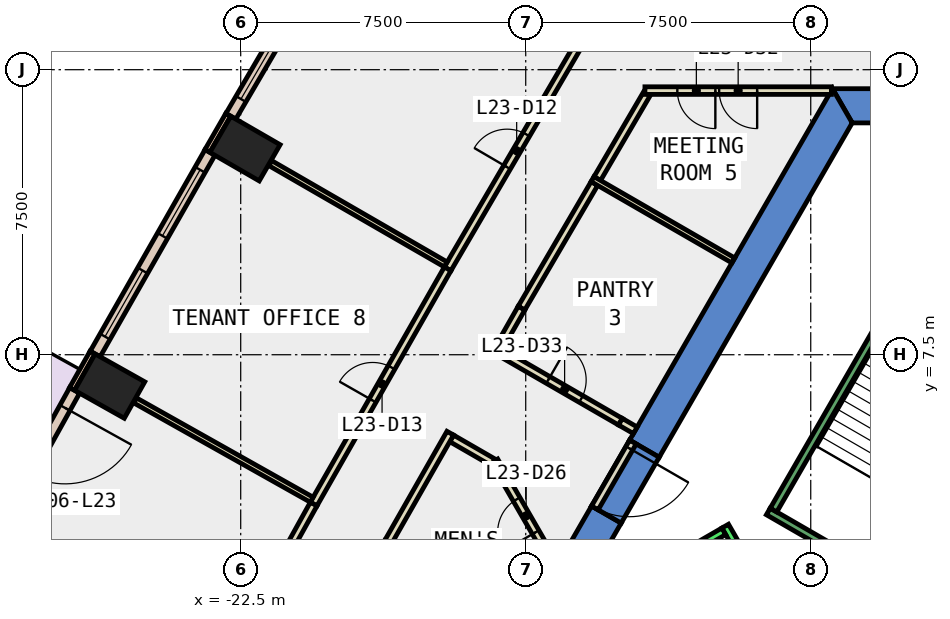
"""IFC4 building model, lengths in metres.
Left out: names, types, materials, properties, quantities, classifications, styles, units other than length and angle.
Written with IfcOpenShell. Run it as: python <this file> out.ifc"""

import sys

from ifc_helpers import new_model, si_unit, direction, frame, frame_2d, origin, origin_2d, place, context, subcontext, project, spatial, polyline, rectangle, outline, extrude, element, fill, save


model = new_model("IFC4")
c1 = context("Model", 3, precision=1e-05, world=origin(), true_north=direction((0.0, 1.0)))
c2 = subcontext(c1, "Body", "Model", "MODEL_VIEW")
j1 = project(units=[si_unit("LENGTHUNIT", "METRE"), si_unit("PLANEANGLEUNIT", "RADIAN")], contexts=[c1])
p1 = place(None, origin())
s1 = spatial("IfcSite", under=j1, at=p1, CompositionType="ELEMENT")
p2 = place(p1, origin())
s2 = spatial("IfcBuilding", under=s1, at=p2, CompositionType="ELEMENT")
p3 = place(p2, frame((0.0, 0.0, 107.6)))
s3 = spatial("IfcBuildingStorey", under=s2, at=p3, CompositionType="ELEMENT", Elevation=107.6)
for number, where, z_axis, x_axis in (
    (1, (-22.387, 12.925, -0.4), (0.0, 0.0, 1.0), (0.5, 0.866, 0.0)),
    (2, (-25.948, 6.675, -0.4), (0.0, 0.0, 1.0), (0.49, 0.872, 0.0)),
):
    element("IfcColumn", number, at=place(p3, frame(where, z_axis=z_axis, x_axis=x_axis)), inside=s3, PredefinedType="COLUMN", context=c2, shape_type="SweptSolid", body=[
        extrude(rectangle(XDim=1.1, YDim=1.5, at=origin_2d()), origin(), (0.0, 0.0, 1.0), 4.2),
    ])
p4 = place(p3, frame((0.0, 0.0, -0.4)))
e3 = element("IfcWall", 3, at=p4, inside=s3, PredefinedType="SHEAR", context=c2, shape_type="SweptSolid", body=[
    extrude(outline(polyline([(-4.55, 13.6), (-4.55, 14.5), (-6.928, 14.5), (-6.409, 13.6), (-4.55, 13.6)])), origin(), (0.0, 0.0, 1.0), 4.2),
])
p5 = place(p3, frame((0.0, 0.0, -0.4)))
e4 = element("IfcWall", 4, at=p5, inside=s3, PredefinedType="SHEAR", context=c2, shape_type="SweptSolid", body=[
    extrude(outline(polyline([(-12.267, 5.252), (-11.488, 4.802), (-6.409, 13.6), (-6.928, 14.5), (-12.267, 5.252)])), origin(), (0.0, 0.0, 1.0), 4.2),
])
p6 = place(p3, frame((0.0, 0.0, -0.4)))
e5 = element("IfcWall", 5, at=p6, inside=s3, PredefinedType="SHEAR", context=c2, shape_type="SweptSolid", body=[
    extrude(outline(polyline([(-12.488, 3.07), (-13.267, 3.52), (-13.856, 2.5), (-12.817, 2.5), (-12.488, 3.07)])), origin(), (0.0, 0.0, 1.0), 4.2),
])
p7 = place(p3, frame((0.0, 0.0, 3.6)))
e6 = element("IfcWall", 6, at=p7, inside=s3, PredefinedType="SHEAR", context=c2, shape_type="SweptSolid", body=[
    extrude(outline(polyline([(-13.267, 3.52), (-12.488, 3.07), (-11.488, 4.802), (-12.267, 5.252), (-13.267, 3.52)])), origin(), (0.0, 0.0, 1.0), 0.2),
])
p8 = place(p3, frame((-22.826, 13.814, 0.0), z_axis=(0.0, 0.0, 1.0), x_axis=(-0.499933745558, -0.866063652425, 0.0)))
e7 = element("IfcWall", 7, at=p8, inside=s3, PredefinedType="STANDARD", context=c2, shape_type="SweptSolid", body=[
    extrude(rectangle(XDim=1.1, YDim=0.15, at=frame_2d((0.55, 0.0))), origin(), (0.0, 0.0, 1.0), 3.8),
])
p9 = place(p3, frame((-26.398, 7.559, 0.0), z_axis=(0.0, 0.0, 1.0), x_axis=(-0.490008344094, -0.871717742574, 0.0)))
e8 = element("IfcWall", 8, at=p9, inside=s3, PredefinedType="STANDARD", context=c2, shape_type="SweptSolid", body=[
    extrude(rectangle(XDim=1.1, YDim=0.15, at=frame_2d((0.55, 0.0))), origin(), (0.0, 0.0, 1.0), 3.8),
])
p10 = place(p3, frame((-19.677, 19.043, 0.0), z_axis=(0.0, 0.0, 1.0), x_axis=(-0.50490018297, -0.863177736759, 0.0)))
e9 = element("IfcWall", 9, at=p10, inside=s3, PredefinedType="STANDARD", context=c2, shape_type="SweptSolid", body=[
    extrude(rectangle(XDim=6.104, YDim=0.3, at=frame_2d((3.052, 0.0))), origin(), (0.0, 0.0, 1.0), 3.8),
])
p11 = place(p10, frame((0.526, 0.0, 0.9)))
e10 = element("IfcOpeningElement", 10, at=p11, cuts=e9, PredefinedType="OPENING", context=c2, shape_type="SweptSolid", body=[
    extrude(rectangle(XDim=2.0, YDim=2.6, at=frame_2d((1.0, 1.3))), frame((0.0, 0.16, 0.0), z_axis=(0.0, -1.0, 0.0), x_axis=(1.0, 0.0, 0.0)), (0.0, 0.0, 1.0), 0.32),
])
p12 = place(p10, frame((3.578, 0.0, 0.9)))
e11 = element("IfcOpeningElement", 11, at=p12, cuts=e9, PredefinedType="OPENING", context=c2, shape_type="SweptSolid", body=[
    extrude(rectangle(XDim=2.0, YDim=2.6, at=frame_2d((1.0, 1.3))), frame((0.0, 0.16, 0.0), z_axis=(0.0, -1.0, 0.0), x_axis=(1.0, 0.0, 0.0)), (0.0, 0.0, 1.0), 0.32),
])
p13 = place(p3, frame((-23.308, 12.823, 0.0), z_axis=(0.0, 0.0, 1.0), x_axis=(-0.495113375427, -0.868828375154, 0.0)))
e12 = element("IfcWall", 12, at=p13, inside=s3, PredefinedType="STANDARD", context=c2, shape_type="SweptSolid", body=[
    extrude(rectangle(XDim=6.104, YDim=0.3, at=frame_2d((3.052, 0.0))), origin(), (0.0, 0.0, 1.0), 3.8),
])
p14 = place(p13, frame((0.526, 0.0, 0.9)))
e13 = element("IfcOpeningElement", 13, at=p14, cuts=e12, PredefinedType="OPENING", context=c2, shape_type="SweptSolid", body=[
    extrude(rectangle(XDim=2.0, YDim=2.6, at=frame_2d((1.0, 1.3))), frame((0.0, 0.16, 0.0), z_axis=(0.0, -1.0, 0.0), x_axis=(1.0, 0.0, 0.0)), (0.0, 0.0, 1.0), 0.32),
])
p15 = place(p13, frame((3.578, 0.0, 0.9)))
e14 = element("IfcOpeningElement", 14, at=p15, cuts=e12, PredefinedType="OPENING", context=c2, shape_type="SweptSolid", body=[
    extrude(rectangle(XDim=2.0, YDim=2.6, at=frame_2d((1.0, 1.3))), frame((0.0, 0.16, 0.0), z_axis=(0.0, -1.0, 0.0), x_axis=(1.0, 0.0, 0.0)), (0.0, 0.0, 1.0), 0.32),
])
p16 = place(p3, frame((-26.869, 6.562, 0.0), z_axis=(0.0, 0.0, 1.0), x_axis=(-0.485170774404, -0.874419418623, 0.0)))
e15 = element("IfcWall", 15, at=p16, inside=s3, PredefinedType="STANDARD", context=c2, shape_type="SweptSolid", body=[
    extrude(rectangle(XDim=6.103, YDim=0.3, at=frame_2d((3.052, 0.0))), origin(), (0.0, 0.0, 1.0), 3.8),
])
p17 = place(p16, frame((0.526, 0.0, 0.0)))
e16 = element("IfcOpeningElement", 16, at=p17, cuts=e15, PredefinedType="OPENING", context=c2, shape_type="SweptSolid", body=[
    extrude(rectangle(XDim=2.0, YDim=2.4, at=frame_2d((1.0, 1.2))), frame((0.0, 0.16, 0.0), z_axis=(0.0, -1.0, 0.0), x_axis=(1.0, 0.0, 0.0)), (0.0, 0.0, 1.0), 0.32),
])
p18 = place(p16, frame((3.578, 0.0, 0.9)))
e17 = element("IfcOpeningElement", 17, at=p18, cuts=e15, PredefinedType="OPENING", context=c2, shape_type="SweptSolid", body=[
    extrude(rectangle(XDim=2.0, YDim=2.6, at=frame_2d((1.0, 1.3))), frame((0.0, 0.16, 0.0), z_axis=(0.0, -1.0, 0.0), x_axis=(1.0, 0.0, 0.0)), (0.0, 0.0, 1.0), 0.32),
])
p19 = place(p3, frame((-11.814, 14.364, 0.0), z_axis=(0.0, 0.0, 1.0), x_axis=(-0.504658640018, -0.863318977583, 0.0)))
e18 = element("IfcWall", 18, at=p19, inside=s3, PredefinedType="PARTITIONING", context=c2, shape_type="SweptSolid", body=[
    extrude(rectangle(XDim=2.582, YDim=0.2, at=frame_2d((1.291, 0.0))), origin(), (0.0, 0.0, 1.0), 3.8),
])
p20 = place(p3, frame((-13.193, 12.005, 0.0), z_axis=(0.0, 0.0, 1.0), x_axis=(-0.50499711829, -0.863121028894, 0.0)))
e19 = element("IfcWall", 19, at=p20, inside=s3, PredefinedType="PARTITIONING", context=c2, shape_type="SweptSolid", body=[
    extrude(rectangle(XDim=3.8, YDim=0.2, at=frame_2d((1.9, 0.0))), origin(), (0.0, 0.0, 1.0), 3.8),
])
p21 = place(p3, frame((-15.112, 8.725, 0.0), z_axis=(0.0, 0.0, 1.0), x_axis=(-0.495074026382, -0.868850797549, 0.0)))
e20 = element("IfcWall", 20, at=p21, inside=s3, PredefinedType="PARTITIONING", context=c2, shape_type="SweptSolid", body=[
    extrude(rectangle(XDim=1.186, YDim=0.2, at=frame_2d((0.593, 0.0))), origin(), (0.0, 0.0, 1.0), 3.8),
])
p22 = place(p3, frame((-15.835, 7.658, 0.0), z_axis=(0.0, 0.0, 1.0), x_axis=(0.866076614194, -0.499911290476, 0.0)))
e21 = element("IfcWall", 21, at=p22, inside=s3, PredefinedType="PARTITIONING", context=c2, shape_type="SweptSolid", body=[
    extrude(rectangle(XDim=3.843, YDim=0.2, at=frame_2d((1.921, 0.0))), origin(), (0.0, 0.0, 1.0), 3.8),
])
p23 = place(p22, frame((1.646, 0.0, 0.0)))
e22 = element("IfcOpeningElement", 22, at=p23, cuts=e21, PredefinedType="OPENING", context=c2, shape_type="SweptSolid", body=[
    extrude(rectangle(XDim=1.0, YDim=2.1, at=frame_2d((0.5, 1.05))), frame((0.0, 0.11, 0.0), z_axis=(0.0, -1.0, 0.0), x_axis=(1.0, 0.0, 0.0)), (0.0, 0.0, 1.0), 0.22),
])
p24 = place(p3, frame((-14.154, 1.815, 0.0), z_axis=(0.0, 0.0, 1.0), x_axis=(-0.500038857296, 0.866002968352, 0.0)))
e23 = element("IfcWall", 23, at=p24, inside=s3, PredefinedType="PARTITIONING", context=c2, shape_type="SweptSolid", body=[
    extrude(rectangle(XDim=3.34, YDim=0.2, at=frame_2d((1.67, 0.0))), origin(), (0.0, 0.0, 1.0), 3.8),
])
p25 = place(p24, frame((1.17, 0.0, 0.0)))
e24 = element("IfcOpeningElement", 24, at=p25, cuts=e23, PredefinedType="OPENING", context=c2, shape_type="SweptSolid", body=[
    extrude(rectangle(XDim=1.0, YDim=2.1, at=frame_2d((0.5, 1.05))), frame((0.0, 0.11, 0.0), z_axis=(0.0, -1.0, 0.0), x_axis=(1.0, 0.0, 0.0)), (0.0, 0.0, 1.0), 0.22),
])
p26 = place(p3, frame((-15.86, 4.671, 0.0), z_axis=(0.0, 0.0, 1.0), x_axis=(-0.866192052573, 0.49971124468, 0.0)))
e25 = element("IfcWall", 25, at=p26, inside=s3, PredefinedType="PARTITIONING", context=c2, shape_type="SweptSolid", body=[
    extrude(rectangle(XDim=1.257, YDim=0.2, at=frame_2d((0.628, 0.0))), origin(), (0.0, 0.0, 1.0), 3.8),
])
p27 = place(p3, frame((-16.986, 5.436, 0.0), z_axis=(0.0, 0.0, 1.0), x_axis=(-0.49514688151, -0.868809280412, 0.0)))
e26 = element("IfcWall", 26, at=p27, inside=s3, PredefinedType="PARTITIONING", context=c2, shape_type="SweptSolid", body=[
    extrude(rectangle(XDim=3.314, YDim=0.2, at=frame_2d((1.657, 0.0))), origin(), (0.0, 0.0, 1.0), 3.8),
])
p28 = place(p3, frame((-17.055, 9.76, 0.0), z_axis=(0.0, 0.0, 1.0), x_axis=(0.504817517618, 0.863226085047, 0.0)))
e27 = element("IfcWall", 27, at=p28, inside=s3, PredefinedType="PARTITIONING", context=c2, shape_type="SweptSolid", body=[
    extrude(rectangle(XDim=7.199, YDim=0.2, at=frame_2d((3.599, 0.0))), origin(), (0.0, 0.0, 1.0), 3.8),
])
p29 = place(p28, frame((3.099, 0.0, 0.0)))
e28 = element("IfcOpeningElement", 28, at=p29, cuts=e27, PredefinedType="OPENING", context=c2, shape_type="SweptSolid", body=[
    extrude(rectangle(XDim=1.0, YDim=2.1, at=frame_2d((0.5, 1.05))), frame((0.0, 0.11, 0.0), z_axis=(0.0, -1.0, 0.0), x_axis=(1.0, 0.0, 0.0)), (0.0, 0.0, 1.0), 0.22),
])
p30 = place(p3, frame((-20.581, 3.571, 0.0), z_axis=(0.0, 0.0, 1.0), x_axis=(0.495138372197, 0.868814129937, 0.0)))
e29 = element("IfcWall", 29, at=p30, inside=s3, PredefinedType="PARTITIONING", context=c2, shape_type="SweptSolid", body=[
    extrude(rectangle(XDim=7.124, YDim=0.2, at=frame_2d((3.562, 0.0))), origin(), (0.0, 0.0, 1.0), 3.8),
])
p31 = place(p30, frame((3.137, 0.0, 0.0)))
e30 = element("IfcOpeningElement", 30, at=p31, cuts=e29, PredefinedType="OPENING", context=c2, shape_type="SweptSolid", body=[
    extrude(rectangle(XDim=1.0, YDim=2.1, at=frame_2d((0.5, 1.05))), frame((0.0, 0.11, 0.0), z_axis=(0.0, -1.0, 0.0), x_axis=(1.0, 0.0, 0.0)), (0.0, 0.0, 1.0), 0.22),
])
p32 = place(p3, frame((-24.0, -2.593, 0.0), z_axis=(0.0, 0.0, 1.0), x_axis=(0.485148833338, 0.874431592242, 0.0)))
e31 = element("IfcWall", 31, at=p32, inside=s3, PredefinedType="PARTITIONING", context=c2, shape_type="SweptSolid", body=[
    extrude(rectangle(XDim=7.049, YDim=0.2, at=frame_2d((3.525, 0.0))), origin(), (0.0, 0.0, 1.0), 3.8),
])
p33 = place(p32, frame((3.099, 0.0, 0.0)))
e32 = element("IfcOpeningElement", 32, at=p33, cuts=e31, PredefinedType="OPENING", context=c2, shape_type="SweptSolid", body=[
    extrude(rectangle(XDim=1.0, YDim=2.1, at=frame_2d((0.5, 1.05))), frame((0.0, 0.11, 0.0), z_axis=(0.0, -1.0, 0.0), x_axis=(1.0, 0.0, 0.0)), (0.0, 0.0, 1.0), 0.22),
])
p34 = place(p3, frame((-9.537, 9.981, 0.0), z_axis=(0.0, 0.0, 1.0), x_axis=(-0.866007866579, 0.5000303741, 0.0)))
e33 = element("IfcWall", 33, at=p34, inside=s3, PredefinedType="PARTITIONING", context=c2, shape_type="SweptSolid", body=[
    extrude(rectangle(XDim=4.278, YDim=0.15, at=frame_2d((2.139, 0.0))), origin(), (0.0, 0.0, 1.0), 3.8),
])
p35 = place(p3, frame((-6.957, 14.45, 0.0), z_axis=(0.0, 0.0, 1.0), x_axis=(-1.0, 0.0, 0.0)))
e34 = element("IfcWall", 34, at=p35, inside=s3, PredefinedType="PARTITIONING", context=c2, shape_type="SweptSolid", body=[
    extrude(rectangle(XDim=4.906, YDim=0.2, at=frame_2d((2.453, 0.0))), origin(), (0.0, 0.0, 1.0), 3.8),
])
p36 = place(p35, frame((1.953, 0.0, 0.0)))
e35 = element("IfcOpeningElement", 35, at=p36, cuts=e34, PredefinedType="OPENING", context=c2, shape_type="SweptSolid", body=[
    extrude(rectangle(XDim=1.0, YDim=2.1, at=frame_2d((0.5, 1.05))), frame((0.0, 0.11, 0.0), z_axis=(0.0, -1.0, 0.0), x_axis=(1.0, 0.0, 0.0)), (0.0, 0.0, 1.0), 0.22),
])
p37 = place(p35, frame((3.053, 0.0, 0.0)))
e36 = element("IfcOpeningElement", 36, at=p37, cuts=e34, PredefinedType="OPENING", context=c2, shape_type="SweptSolid", body=[
    extrude(rectangle(XDim=1.0, YDim=2.1, at=frame_2d((0.5, 1.05))), frame((0.0, 0.11, 0.0), z_axis=(0.0, -1.0, 0.0), x_axis=(1.0, 0.0, 0.0)), (0.0, 0.0, 1.0), 0.22),
])
p38 = place(p3, frame((-17.104, 9.875, 0.0), z_axis=(0.0, 0.0, 1.0), x_axis=(-0.866024640963, 0.500001321243, 0.0)))
e37 = element("IfcWall", 37, at=p38, inside=s3, PredefinedType="PARTITIONING", context=c2, shape_type="SweptSolid", body=[
    extrude(rectangle(XDim=5.33, YDim=0.15, at=frame_2d((2.665, 0.0))), origin(), (0.0, 0.0, 1.0), 3.8),
])
p39 = place(p3, frame((-20.631, 3.685, 0.0), z_axis=(0.0, 0.0, 1.0), x_axis=(-0.871680720442, 0.490074200106, 0.0)))
e38 = element("IfcWall", 38, at=p39, inside=s3, PredefinedType="PARTITIONING", context=c2, shape_type="SweptSolid", body=[
    extrude(rectangle(XDim=5.33, YDim=0.15, at=frame_2d((2.665, 0.0))), origin(), (0.0, 0.0, 1.0), 3.8),
])
p40 = place(p3, frame((-12.18, 5.202, 0.0), z_axis=(0.0, 0.0, 1.0), x_axis=(-0.50002537861, -0.866010750942, 0.0)))
e39 = element("IfcWall", 39, at=p40, inside=s3, PredefinedType="PARTITIONING", context=c2, shape_type="SweptSolid", body=[
    extrude(rectangle(XDim=2.0, YDim=0.2, at=frame_2d((1.0, 0.0))), origin(), (0.0, 0.0, 1.0), 2.4),
])
p41 = place(p40, frame((0.19, 0.0, 0.0)))
e40 = element("IfcOpeningElement", 40, at=p41, cuts=e39, PredefinedType="OPENING", context=c2, shape_type="SweptSolid", body=[
    extrude(rectangle(XDim=1.8, YDim=2.1, at=frame_2d((0.9, 1.05))), frame((0.0, 0.11, 0.0), z_axis=(0.0, -1.0, 0.0), x_axis=(1.0, 0.0, 0.0)), (0.0, 0.0, 1.0), 0.22),
])
p42 = place(p3, frame((-12.507, 5.737, 0.0), z_axis=(0.0, 0.0, 1.0), x_axis=(0.866167537795, -0.499753735824, 0.0)))
e41 = element("IfcWall", 41, at=p42, inside=s3, PredefinedType="PARTITIONING", context=c2, shape_type="SweptSolid", body=[
    extrude(rectangle(XDim=0.45, YDim=0.2, at=frame_2d((0.225, 0.0))), origin(), (0.0, 0.0, 1.0), 2.4),
])
p43 = place(p3, frame((-9.751, 2.99, 0.0), z_axis=(0.0, 0.0, 1.0), x_axis=(0.50000090737, -0.866024879913, 0.0)))
e42 = element("IfcWall", 42, at=p43, inside=s3, PredefinedType="STANDARD", context=c2, shape_type="SweptSolid", body=[
    extrude(rectangle(XDim=10.6, YDim=0.2, at=frame_2d((5.3, 0.0))), origin(), (0.0, 0.0, 1.0), 3.8),
])
p44 = place(p3, frame((-9.788, 2.853, 0.0), z_axis=(0.0, 0.0, 1.0), x_axis=(-0.865998541277, -0.500046524342, 0.0)))
e43 = element("IfcWall", 43, at=p44, inside=s3, PredefinedType="STANDARD", context=c2, shape_type="SweptSolid", body=[
    extrude(rectangle(XDim=2.5, YDim=0.2, at=frame_2d((1.25, 0.0))), origin(), (0.0, 0.0, 1.0), 3.8),
])
p45 = place(p3, frame((-6.25, 2.01, 0.0), z_axis=(0.0, 0.0, 1.0), x_axis=(-0.86611865017, 0.499838457731, 0.0)))
e44 = element("IfcWall", 44, at=p45, inside=s3, PredefinedType="STANDARD", context=c2, shape_type="SweptSolid", body=[
    extrude(rectangle(XDim=2.733, YDim=0.2, at=frame_2d((1.366, 0.0))), origin(), (0.0, 0.0, 1.0), 3.8),
])
p46 = place(p3, frame((-5.03, 9.388, 0.0), z_axis=(0.0, 0.0, 1.0), x_axis=(-0.499978703459, -0.866037698999, 0.0)))
e45 = element("IfcWall", 45, at=p46, inside=s3, PredefinedType="STANDARD", context=c2, shape_type="SweptSolid", body=[
    extrude(rectangle(XDim=6.9, YDim=0.2, at=frame_2d((3.45, 0.0))), origin(), (0.0, 0.0, 1.0), 3.8),
])
p47 = place(p12, origin())
e46 = element("IfcWindow", 46, at=p47, inside=s3, PartitioningType="SINGLE_PANEL", PredefinedType="WINDOW", context=c2, shape_type="SweptSolid", body=[
    extrude(rectangle(XDim=2.0, YDim=2.6, at=frame_2d((1.0, 1.3))), frame((0.0, 0.03, 0.0), z_axis=(0.0, -1.0, 0.0), x_axis=(1.0, 0.0, 0.0)), (0.0, 0.0, 1.0), 0.06),
])
fill(e11, e46)
p48 = place(p14, origin())
e47 = element("IfcWindow", 47, at=p48, inside=s3, PartitioningType="SINGLE_PANEL", PredefinedType="WINDOW", context=c2, shape_type="SweptSolid", body=[
    extrude(rectangle(XDim=2.0, YDim=2.6, at=frame_2d((1.0, 1.3))), frame((0.0, 0.03, 0.0), z_axis=(0.0, -1.0, 0.0), x_axis=(1.0, 0.0, 0.0)), (0.0, 0.0, 1.0), 0.06),
])
fill(e13, e47)
p49 = place(p15, origin())
e48 = element("IfcWindow", 48, at=p49, inside=s3, PartitioningType="SINGLE_PANEL", PredefinedType="WINDOW", context=c2, shape_type="SweptSolid", body=[
    extrude(rectangle(XDim=2.0, YDim=2.6, at=frame_2d((1.0, 1.3))), frame((0.0, 0.03, 0.0), z_axis=(0.0, -1.0, 0.0), x_axis=(1.0, 0.0, 0.0)), (0.0, 0.0, 1.0), 0.06),
])
fill(e14, e48)
p50 = place(p17, origin())
e49 = element("IfcDoor", 49, at=p50, inside=s3, OperationType="SLIDING_TO_LEFT", PredefinedType="DOOR", context=c2, shape_type="SweptSolid", body=[
    extrude(rectangle(XDim=2.0, YDim=2.4, at=frame_2d((1.0, 1.2))), frame((0.0, 0.025, 0.0), z_axis=(0.0, -1.0, 0.0), x_axis=(1.0, 0.0, 0.0)), (0.0, 0.0, 1.0), 0.05),
])
fill(e16, e49)
p51 = place(p29, origin())
e50 = element("IfcDoor", 50, at=p51, inside=s3, OperationType="SINGLE_SWING_LEFT", PredefinedType="DOOR", context=c2, shape_type="SweptSolid", body=[
    extrude(rectangle(XDim=1.0, YDim=2.1, at=frame_2d((0.5, 1.05))), frame((0.0, 0.025, 0.0), z_axis=(0.0, -1.0, 0.0), x_axis=(1.0, 0.0, 0.0)), (0.0, 0.0, 1.0), 0.05),
])
fill(e28, e50)
p52 = place(p31, origin())
e51 = element("IfcDoor", 51, at=p52, inside=s3, OperationType="SINGLE_SWING_LEFT", PredefinedType="DOOR", context=c2, shape_type="SweptSolid", body=[
    extrude(rectangle(XDim=1.0, YDim=2.1, at=frame_2d((0.5, 1.05))), frame((0.0, 0.025, 0.0), z_axis=(0.0, -1.0, 0.0), x_axis=(1.0, 0.0, 0.0)), (0.0, 0.0, 1.0), 0.05),
])
fill(e30, e51)
p53 = place(p25, origin())
e52 = element("IfcDoor", 52, at=p53, inside=s3, OperationType="SINGLE_SWING_LEFT", PredefinedType="DOOR", context=c2, shape_type="SweptSolid", body=[
    extrude(rectangle(XDim=1.0, YDim=2.1, at=frame_2d((0.5, 1.05))), frame((0.0, 0.025, 0.0), z_axis=(0.0, -1.0, 0.0), x_axis=(1.0, 0.0, 0.0)), (0.0, 0.0, 1.0), 0.05),
])
fill(e24, e52)
p54 = place(p36, origin())
e53 = element("IfcDoor", 53, at=p54, inside=s3, OperationType="SINGLE_SWING_LEFT", PredefinedType="DOOR", context=c2, shape_type="SweptSolid", body=[
    extrude(rectangle(XDim=1.0, YDim=2.1, at=frame_2d((0.5, 1.05))), frame((0.0, 0.025, 0.0), z_axis=(0.0, -1.0, 0.0), x_axis=(1.0, 0.0, 0.0)), (0.0, 0.0, 1.0), 0.05),
])
fill(e35, e53)
p55 = place(p23, origin())
e54 = element("IfcDoor", 54, at=p55, inside=s3, OperationType="SINGLE_SWING_LEFT", PredefinedType="DOOR", context=c2, shape_type="SweptSolid", body=[
    extrude(rectangle(XDim=1.0, YDim=2.1, at=frame_2d((0.5, 1.05))), frame((0.0, 0.025, 0.0), z_axis=(0.0, -1.0, 0.0), x_axis=(1.0, 0.0, 0.0)), (0.0, 0.0, 1.0), 0.05),
])
fill(e22, e54)
p56 = place(p37, origin())
e55 = element("IfcDoor", 55, at=p56, inside=s3, OperationType="SINGLE_SWING_RIGHT", PredefinedType="DOOR", context=c2, shape_type="SweptSolid", body=[
    extrude(rectangle(XDim=1.0, YDim=2.1, at=frame_2d((0.5, 1.05))), frame((0.0, 0.025, 0.0), z_axis=(0.0, -1.0, 0.0), x_axis=(1.0, 0.0, 0.0)), (0.0, 0.0, 1.0), 0.05),
])
fill(e36, e55)
p57 = place(p41, origin())
e56 = element("IfcDoor", 56, at=p57, inside=s3, OperationType="DOUBLE_DOOR_SINGLE_SWING", PredefinedType="DOOR", context=c2, shape_type="SweptSolid", body=[
    extrude(rectangle(XDim=1.8, YDim=2.1, at=frame_2d((0.9, 1.05))), frame((0.0, 0.025, 0.0), z_axis=(0.0, -1.0, 0.0), x_axis=(1.0, 0.0, 0.0)), (0.0, 0.0, 1.0), 0.05),
])
fill(e40, e56)
save(model, sys.argv[1])
